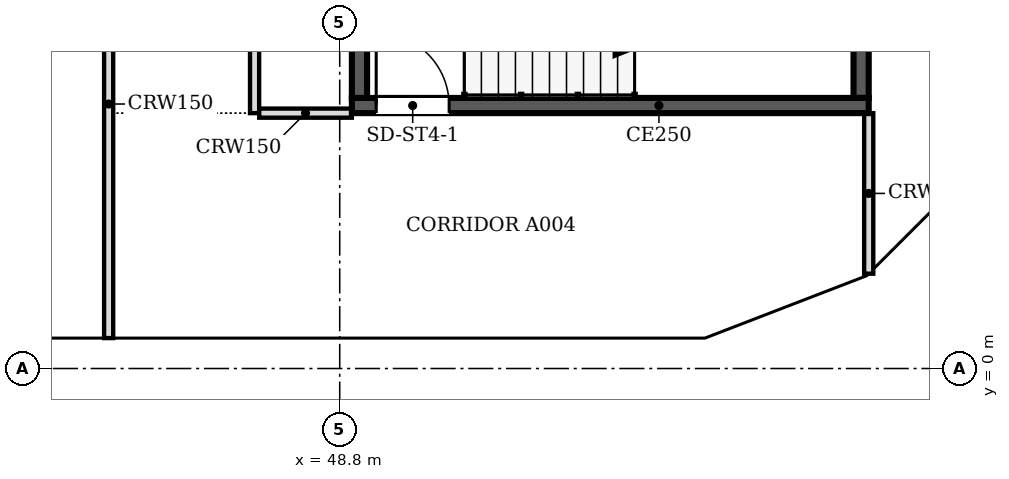
"""IFC4 building model, lengths in metres.
Left out: names, types, materials, properties, quantities, classifications, styles, units other than length and angle.
Written with IfcOpenShell. Run it as: python <this file> out.ifc"""

import sys

from ifc_helpers import new_model, si_unit, direction, frame, frame_2d, origin, place, context, subcontext, project, spatial, polyline, rectangle, outline, extrude, faceted_brep, source, transform, mapped, element, fill, save


model = new_model("IFC4")
c1 = context("Model", 3, precision=1e-05, world=origin(), true_north=direction((0.0, 1.0)))
c2 = subcontext(c1, "Body", "Model", "MODEL_VIEW")
j1 = project(units=[si_unit("LENGTHUNIT", "METRE"), si_unit("PLANEANGLEUNIT", "RADIAN")], contexts=[c1])
p1 = place(None, origin())
s1 = spatial("IfcSite", under=j1, at=p1, CompositionType="ELEMENT")
p2 = place(p1, origin())
s2 = spatial("IfcBuilding", under=s1, at=p2, CompositionType="ELEMENT")
p3 = place(p2, frame((0.0, 0.0, 41.0)))
s3 = spatial("IfcBuildingStorey", under=s2, at=p3, CompositionType="ELEMENT", Elevation=41.0)
m1 = source(origin(), c2, "Body", "SweptSolid", [
    extrude(outline(polyline([(3.05, 0.0), (6.1, 3.8), (3.05, 7.6), (0.0, 3.8), (3.05, 0.0)])), frame((0.0, 0.25, 0.0), z_axis=(0.0, -1.0, 0.0), x_axis=(1.0, 0.0, 0.0)), (0.0, 0.0, 1.0), 0.5),
])
p4 = place(p3, frame((39.65, 0.25, -3.8), z_axis=(0.0, 0.0, 1.0), x_axis=(1.0, 0.0, 0.0)))
e1 = element("IfcWall", 1, at=p4, inside=s3, PredefinedType="SOLIDWALL", context=c2, shape_type="MappedRepresentation", body=[
    mapped(m1, transform((0.0, 0.0, 0.0), scale=1.0)),
])
m2 = source(origin(), c2, "Body", "SweptSolid", [
    extrude(outline(polyline([(3.05, 0.399), (5.78, 3.8), (3.05, 7.201), (0.321, 3.8), (3.05, 0.399)])), frame((0.0, 0.26, 0.0), z_axis=(0.0, -1.0, 0.0), x_axis=(1.0, 0.0, 0.0)), (0.0, 0.0, 1.0), 0.52),
])
p5 = place(p4, origin())
e2 = element("IfcOpeningElement", 2, at=p5, cuts=e1, PredefinedType="OPENING", context=c2, shape_type="MappedRepresentation", body=[
    mapped(m2, transform((0.0, 0.0, 0.0), scale=1.0)),
])
p6 = place(p3, frame((45.75, 0.25, -3.8), z_axis=(0.0, 0.0, 1.0), x_axis=(1.0, 0.0, 0.0)))
e3 = element("IfcWall", 3, at=p6, inside=s3, PredefinedType="SOLIDWALL", context=c2, shape_type="MappedRepresentation", body=[
    mapped(m1, transform((0.0, 0.0, 0.0), scale=1.0)),
])
p7 = place(p6, origin())
e4 = element("IfcOpeningElement", 4, at=p7, cuts=e3, PredefinedType="OPENING", context=c2, shape_type="MappedRepresentation", body=[
    mapped(m2, transform((0.0, 0.0, 0.0), scale=1.0)),
])
m3 = source(origin(), c2, "Body", "Brep", [
    faceted_brep([(3.003, -0.25, 0.0), (3.05, -0.25, 0.06), (3.05, -0.25, 7.54), (3.003, -0.25, 7.6), (0.0, -0.25, 3.8), (0.0, 0.25, 3.8), (2.957, 0.25, 7.541), (2.957, 0.25, 0.059), (3.003, 0.0, 0.0), (3.003, 0.0, 7.6)], [[[0, 1, 2, 3, 4]], [[5, 6, 7]], [[1, 0, 8]], [[9, 3, 2]], [[6, 5, 4, 3, 9]], [[5, 7, 8, 0, 4]], [[1, 8, 7, 6, 9, 2]]]),
])
p8 = place(p3, frame((51.85, 0.25, -3.8), z_axis=(0.0, 0.0, 1.0), x_axis=(1.0, 0.0, 0.0)))
e5 = element("IfcWall", 5, at=p8, inside=s3, PredefinedType="SOLIDWALL", context=c2, shape_type="MappedRepresentation", body=[
    mapped(m3, transform((0.0, 0.0, 0.0), scale=1.0)),
])
m4 = source(origin(), c2, "Body", "SweptSolid", [
    extrude(outline(polyline([(2.803, 6.944), (0.319, 3.8), (2.803, 0.656), (2.803, 6.944)])), frame((0.0, 0.26, 0.0), z_axis=(0.0, -1.0, 0.0), x_axis=(1.0, 0.0, 0.0)), (0.0, 0.0, 1.0), 0.52),
])
p9 = place(p8, origin())
e6 = element("IfcOpeningElement", 6, at=p9, cuts=e5, PredefinedType="OPENING", context=c2, shape_type="MappedRepresentation", body=[
    mapped(m4, transform((0.0, 0.0, 0.0), scale=1.0)),
])
m5 = source(origin(), c2, "Body", "Brep", [
    faceted_brep([(0.047, -0.25, 0.0), (2.997, -0.25, 3.8), (0.047, -0.25, 7.6), (0.0, -0.25, 7.541), (0.0, -0.25, 0.059), (0.093, 0.25, 7.54), (2.944, 0.25, 3.868), (2.944, 0.25, 3.732), (0.093, 0.25, 0.06), (2.997, 0.0, 3.8), (0.047, 0.0, 0.0), (0.047, 0.0, 7.6)], [[[0, 1, 2, 3, 4]], [[5, 6, 7, 8]], [[8, 7, 9, 1, 0, 10]], [[6, 5, 11, 2, 1, 9]], [[3, 2, 11]], [[10, 0, 4]], [[8, 10, 4, 3, 11, 5]], [[9, 7, 6]]]),
])
p10 = place(p3, frame((54.81, 0.233, -3.8), z_axis=(0.0, 0.0, 1.0), x_axis=(0.932990326376, 0.359901446078, 0.0)))
e7 = element("IfcWall", 7, at=p10, inside=s3, PredefinedType="SOLIDWALL", context=c2, shape_type="MappedRepresentation", body=[
    mapped(m5, transform((0.0, 0.0, 0.0), scale=1.0)),
])
m6 = source(origin(), c2, "Body", "SweptSolid", [
    extrude(outline(polyline([(0.247, 0.665), (2.681, 3.8), (0.247, 6.935), (0.247, 0.665)])), frame((0.0, 0.26, 0.0), z_axis=(0.0, -1.0, 0.0), x_axis=(1.0, 0.0, 0.0)), (0.0, 0.0, 1.0), 0.52),
])
p11 = place(p10, origin())
e8 = element("IfcOpeningElement", 8, at=p11, cuts=e7, PredefinedType="OPENING", context=c2, shape_type="MappedRepresentation", body=[
    mapped(m6, transform((0.0, 0.0, 0.0), scale=1.0)),
])
m7 = source(origin(), c2, "Body", "Brep", [
    faceted_brep([(2.944, -0.25, 0.0), (2.997, -0.25, 0.068), (2.997, -0.25, 7.532), (2.944, -0.25, 7.6), (0.0, -0.25, 3.8), (0.053, 0.25, 3.868), (2.891, 0.25, 7.532), (2.891, 0.25, 0.068), (0.053, 0.25, 3.732), (2.944, 0.0, 0.0), (2.944, 0.0, 7.6), (0.0, 0.0, 3.8)], [[[0, 1, 2, 3, 4]], [[5, 6, 7, 8]], [[1, 0, 9]], [[10, 3, 2]], [[6, 5, 11, 4, 3, 10]], [[8, 7, 9, 0, 4, 11]], [[8, 11, 5]], [[1, 9, 7, 6, 10, 2]]]),
])
p12 = place(p3, frame((57.606, 1.312, -3.8), z_axis=(0.0, 0.0, 1.0), x_axis=(0.707147509625, 0.707066050402, 0.0)))
e9 = element("IfcWall", 9, at=p12, inside=s3, PredefinedType="SOLIDWALL", context=c2, shape_type="MappedRepresentation", body=[
    mapped(m7, transform((0.0, 0.0, 0.0), scale=1.0)),
])
m8 = source(origin(), c2, "Body", "SweptSolid", [
    extrude(outline(polyline([(2.744, 6.934), (0.316, 3.8), (2.744, 0.666), (2.744, 6.934)])), frame((0.0, 0.26, 0.0), z_axis=(0.0, -1.0, 0.0), x_axis=(1.0, 0.0, 0.0)), (0.0, 0.0, 1.0), 0.52),
])
p13 = place(p12, origin())
e10 = element("IfcOpeningElement", 10, at=p13, cuts=e9, PredefinedType="OPENING", context=c2, shape_type="MappedRepresentation", body=[
    mapped(m8, transform((0.0, 0.0, 0.0), scale=1.0)),
])
p14 = place(p2, frame((0.0, 0.0, 44.8)))
s4 = spatial("IfcBuildingStorey", under=s2, at=p14, CompositionType="ELEMENT", Elevation=44.8)
p15 = place(p14, frame((42.7, 0.25, -3.8), z_axis=(0.0, 0.0, 1.0), x_axis=(1.0, 0.0, 0.0)))
e11 = element("IfcWall", 11, at=p15, inside=s4, PredefinedType="SOLIDWALL", context=c2, shape_type="MappedRepresentation", body=[
    mapped(m1, transform((0.0, 0.0, 0.0), scale=1.0)),
])
p16 = place(p15, origin())
e12 = element("IfcOpeningElement", 12, at=p16, cuts=e11, PredefinedType="OPENING", context=c2, shape_type="MappedRepresentation", body=[
    mapped(m2, transform((0.0, 0.0, 0.0), scale=1.0)),
])
m9 = source(origin(), c2, "Body", "Brep", [
    faceted_brep([(3.05, -0.25, 0.0), (6.053, -0.25, 3.8), (3.05, -0.25, 7.6), (0.0, -0.25, 3.8), (0.0, 0.25, 3.8), (3.05, 0.25, 7.6), (6.007, 0.25, 3.859), (6.007, 0.25, 3.741), (3.05, 0.25, 0.0), (6.053, 0.0, 3.8)], [[[0, 1, 2, 3]], [[4, 5, 6, 7, 8]], [[8, 7, 9, 1, 0]], [[6, 5, 2, 1, 9]], [[5, 4, 3, 2]], [[4, 8, 0, 3]], [[9, 7, 6]]]),
])
p17 = place(p14, frame((48.8, 0.25, -3.8), z_axis=(0.0, 0.0, 1.0), x_axis=(1.0, 0.0, 0.0)))
e13 = element("IfcWall", 13, at=p17, inside=s4, PredefinedType="SOLIDWALL", context=c2, shape_type="MappedRepresentation", body=[
    mapped(m9, transform((0.0, 0.0, 0.0), scale=1.0)),
])
m10 = source(origin(), c2, "Body", "SweptSolid", [
    extrude(outline(polyline([(3.049, 0.401), (5.735, 3.8), (3.049, 7.199), (0.321, 3.8), (3.049, 0.401)])), frame((0.0, 0.26, 0.0), z_axis=(0.0, -1.0, 0.0), x_axis=(1.0, 0.0, 0.0)), (0.0, 0.0, 1.0), 0.52),
])
p18 = place(p17, origin())
e14 = element("IfcOpeningElement", 14, at=p18, cuts=e13, PredefinedType="OPENING", context=c2, shape_type="MappedRepresentation", body=[
    mapped(m10, transform((0.0, 0.0, 0.0), scale=1.0)),
])
m11 = source(origin(), c2, "Body", "Brep", [
    faceted_brep([(2.95, -0.25, 0.0), (3.003, -0.25, 0.068), (3.003, -0.25, 7.532), (2.95, -0.25, 7.6), (0.0, -0.25, 3.8), (0.047, 0.25, 3.86), (2.898, 0.25, 7.532), (2.898, 0.25, 0.068), (0.047, 0.25, 3.74), (2.95, 0.0, 0.0), (2.95, 0.0, 7.6), (0.0, 0.0, 3.8)], [[[0, 1, 2, 3, 4]], [[5, 6, 7, 8]], [[1, 0, 9]], [[10, 3, 2]], [[6, 5, 11, 4, 3, 10]], [[8, 7, 9, 0, 4, 11]], [[8, 11, 5]], [[1, 9, 7, 6, 10, 2]]]),
])
p19 = place(p14, frame((54.854, 0.25, -3.8), z_axis=(0.0, 0.0, 1.0), x_axis=(0.932970071518, 0.359953949349, 0.0)))
e15 = element("IfcWall", 15, at=p19, inside=s4, PredefinedType="SOLIDWALL", context=c2, shape_type="MappedRepresentation", body=[
    mapped(m11, transform((0.0, 0.0, 0.0), scale=1.0)),
])
m12 = source(origin(), c2, "Body", "SweptSolid", [
    extrude(outline(polyline([(2.75, 6.935), (0.316, 3.8), (2.75, 0.665), (2.75, 6.935)])), frame((0.0, 0.26, 0.0), z_axis=(0.0, -1.0, 0.0), x_axis=(1.0, 0.0, 0.0)), (0.0, 0.0, 1.0), 0.52),
])
p20 = place(p19, origin())
e16 = element("IfcOpeningElement", 16, at=p20, cuts=e15, PredefinedType="OPENING", context=c2, shape_type="MappedRepresentation", body=[
    mapped(m12, transform((0.0, 0.0, 0.0), scale=1.0)),
])
m13 = source(origin(), c2, "Body", "Brep", [
    faceted_brep([(0.053, -0.25, 0.0), (2.997, -0.25, 3.8), (0.053, -0.25, 7.6), (0.0, -0.25, 7.532), (0.0, -0.25, 0.068), (0.106, 0.25, 7.532), (2.944, 0.25, 3.868), (2.944, 0.25, 3.732), (0.106, 0.25, 0.068), (2.997, 0.0, 3.8), (0.053, 0.0, 0.0), (0.053, 0.0, 7.6)], [[[0, 1, 2, 3, 4]], [[5, 6, 7, 8]], [[8, 7, 9, 1, 0, 10]], [[6, 5, 11, 2, 1, 9]], [[3, 2, 11]], [[10, 0, 4]], [[8, 10, 4, 3, 11, 5]], [[9, 7, 6]]]),
])
p21 = place(p14, frame((57.569, 1.274, -3.8), z_axis=(0.0, 0.0, 1.0), x_axis=(0.707066050402, 0.707147509625, 0.0)))
e17 = element("IfcWall", 17, at=p21, inside=s4, PredefinedType="SOLIDWALL", context=c2, shape_type="MappedRepresentation", body=[
    mapped(m13, transform((0.0, 0.0, 0.0), scale=1.0)),
])
m14 = source(origin(), c2, "Body", "SweptSolid", [
    extrude(outline(polyline([(0.253, 0.666), (2.681, 3.8), (0.253, 6.934), (0.253, 0.666)])), frame((0.0, 0.26, 0.0), z_axis=(0.0, -1.0, 0.0), x_axis=(1.0, 0.0, 0.0)), (0.0, 0.0, 1.0), 0.52),
])
p22 = place(p21, origin())
e18 = element("IfcOpeningElement", 18, at=p22, cuts=e17, PredefinedType="OPENING", context=c2, shape_type="MappedRepresentation", body=[
    mapped(m14, transform((0.0, 0.0, 0.0), scale=1.0)),
])
p23 = place(p3, frame((57.5, 4.325, 0.0), z_axis=(0.0, 0.0, 1.0), x_axis=(-1.0, 0.0, 0.0)))
e19 = element("IfcWall", 19, at=p23, inside=s3, PredefinedType="SOLIDWALL", context=c2, shape_type="SweptSolid", body=[
    extrude(rectangle(XDim=8.5, YDim=0.25, at=frame_2d((4.25, 0.0))), origin(), (0.0, 0.0, 1.0), 3.8),
])
m15 = source(origin(), c2, "Body", "SweptSolid", [
    extrude(rectangle(XDim=1.2, YDim=2.1, at=frame_2d((0.6, 1.05))), frame((0.0, 0.135, 0.0), z_axis=(0.0, -1.0, 0.0), x_axis=(1.0, 0.0, 0.0)), (0.0, 0.0, 1.0), 0.27),
])
p24 = place(p23, frame((6.9, 0.0, 0.0)))
e20 = element("IfcOpeningElement", 20, at=p24, cuts=e19, PredefinedType="OPENING", context=c2, shape_type="MappedRepresentation", body=[
    mapped(m15, transform((0.0, 0.0, 0.0), scale=1.0)),
])
for number, where, z_axis, x_axis in (
    (21, (49.125, 4.45, 0.0), (0.0, 0.0, 1.0), (0.0, 1.0, 0.0)),
    (22, (57.375, 7.85, 0.0), (0.0, 0.0, 1.0), (0.0, -1.0, 0.0)),
):
    element("IfcWall", number, at=place(p3, frame(where, z_axis=z_axis, x_axis=x_axis)), inside=s3, PredefinedType="SOLIDWALL", context=c2, shape_type="SweptSolid", body=[
        extrude(rectangle(XDim=3.4, YDim=0.25, at=frame_2d((1.7, 0.0))), origin(), (0.0, 0.0, 1.0), 3.8),
    ])
p25 = place(p3, frame((45.0, 0.5, 0.0), z_axis=(0.0, 0.0, 1.0), x_axis=(0.0, 1.0, 0.0)))
e23 = element("IfcWall", 23, at=p25, inside=s3, PredefinedType="PARTITIONING", context=c2, shape_type="SweptSolid", body=[
    extrude(rectangle(XDim=21.724, YDim=0.15, at=frame_2d((10.862, 0.0))), origin(), (0.0, 0.0, 1.0), 3.067),
])
m16 = source(origin(), c2, "Body", "SweptSolid", [
    extrude(rectangle(XDim=1.0, YDim=2.1, at=frame_2d((0.5, 1.05))), frame((0.0, 0.085, 0.0), z_axis=(0.0, -1.0, 0.0), x_axis=(1.0, 0.0, 0.0)), (0.0, 0.0, 1.0), 0.17),
])
p26 = place(p25, frame((15.001, 0.0, 0.0)))
e24 = element("IfcOpeningElement", 24, at=p26, cuts=e23, PredefinedType="OPENING", context=c2, shape_type="MappedRepresentation", body=[
    mapped(m16, transform((0.0, 0.0, 0.0), scale=1.0)),
])
p27 = place(p25, frame((7.7, 0.0, 0.0)))
e25 = element("IfcOpeningElement", 25, at=p27, cuts=e23, PredefinedType="OPENING", context=c2, shape_type="MappedRepresentation", body=[
    mapped(m16, transform((0.0, 0.0, 0.0), scale=1.0)),
])
p28 = place(p3, frame((57.5, 1.559, 0.0), z_axis=(0.0, 0.0, 1.0), x_axis=(0.0, 1.0, 0.0)))
e26 = element("IfcWall", 26, at=p28, inside=s3, PredefinedType="PARTITIONING", context=c2, shape_type="SweptSolid", body=[
    extrude(rectangle(XDim=2.641, YDim=0.15, at=frame_2d((1.32, 0.0))), origin(), (0.0, 0.0, 1.0), 3.067),
])
p29 = place(p3, frame((47.4, 22.224, 0.0), z_axis=(0.0, 0.0, 1.0), x_axis=(0.0, -1.0, 0.0)))
e27 = element("IfcWall", 27, at=p29, inside=s3, PredefinedType="PARTITIONING", context=c2, shape_type="SweptSolid", body=[
    extrude(rectangle(XDim=18.024, YDim=0.15, at=frame_2d((9.012, 0.0))), origin(), (0.0, 0.0, 1.0), 3.067),
])
m17 = source(origin(), c2, "Body", "SweptSolid", [
    extrude(rectangle(XDim=0.9, YDim=2.1, at=frame_2d((0.45, 1.05))), frame((0.0, 0.085, 0.0), z_axis=(0.0, -1.0, 0.0), x_axis=(1.0, 0.0, 0.0)), (0.0, 0.0, 1.0), 0.17),
])
p30 = place(p29, frame((3.623, 0.0, 0.0)))
e28 = element("IfcOpeningElement", 28, at=p30, cuts=e27, PredefinedType="OPENING", context=c2, shape_type="MappedRepresentation", body=[
    mapped(m17, transform((0.0, 0.0, 0.0), scale=1.0)),
])
p31 = place(p29, frame((12.624, 0.0, 0.0)))
e29 = element("IfcOpeningElement", 29, at=p31, cuts=e27, PredefinedType="OPENING", context=c2, shape_type="MappedRepresentation", body=[
    mapped(m17, transform((0.0, 0.0, 0.0), scale=1.0)),
])
p32 = place(p3, frame((47.476, 4.2, 0.0), z_axis=(0.0, 0.0, 1.0), x_axis=(1.0, 0.0, 0.0)))
e30 = element("IfcWall", 30, at=p32, inside=s3, PredefinedType="PARTITIONING", context=c2, shape_type="SweptSolid", body=[
    extrude(rectangle(XDim=1.524, YDim=0.15, at=frame_2d((0.762, 0.0))), origin(), (0.0, 0.0, 1.0), 3.067),
])
m18 = source(origin(), c2, "Body", "SweptSolid", [
    extrude(rectangle(XDim=1.2, YDim=2.1, at=frame_2d((0.6, 1.05))), frame((0.0, 0.025, 0.0), z_axis=(0.0, -1.0, 0.0), x_axis=(1.0, 0.0, 0.0)), (0.0, 0.0, 1.0), 0.05),
])
p33 = place(p24, origin())
e31 = element("IfcDoor", 31, at=p33, inside=s3, OperationType="SINGLE_SWING_RIGHT", PredefinedType="DOOR", context=c2, shape_type="MappedRepresentation", body=[
    mapped(m18, transform((0.0, 0.0, 0.0), scale=1.0)),
])
fill(e20, e31)
save(model, sys.argv[1])
